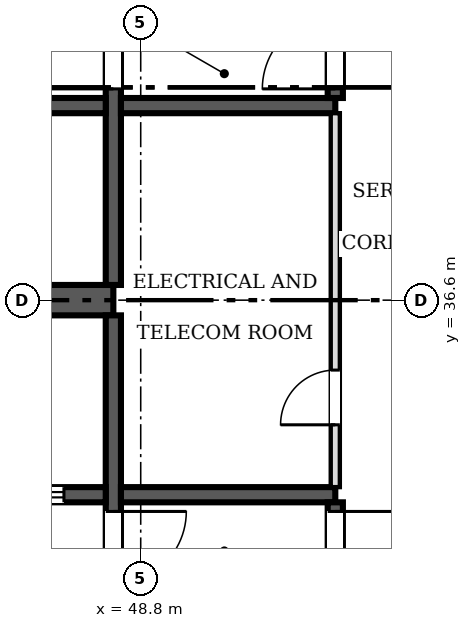
"""IFC4 building model, lengths in metres.
Left out: names, types, materials, properties, quantities, classifications, styles, units other than length and angle.
Written with IfcOpenShell. Run it as: python <this file> out.ifc"""

import sys

from ifc_helpers import new_model, si_unit, direction, frame, frame_2d, origin, place, context, subcontext, project, spatial, rectangle, extrude, source, transform, mapped, element, fill, save


model = new_model("IFC4")
c1 = context("Model", 3, precision=1e-05, world=origin(), true_north=direction((0.0, 1.0)))
c2 = subcontext(c1, "Body", "Model", "MODEL_VIEW")
j1 = project(units=[si_unit("LENGTHUNIT", "METRE"), si_unit("PLANEANGLEUNIT", "RADIAN")], contexts=[c1])
p1 = place(None, origin())
s1 = spatial("IfcSite", under=j1, at=p1, CompositionType="ELEMENT")
p2 = place(p1, origin())
s2 = spatial("IfcBuilding", under=s1, at=p2, CompositionType="ELEMENT")
p3 = place(p2, frame((0.0, 0.0, 52.4)))
s3 = spatial("IfcBuildingStorey", under=s2, at=p3, CompositionType="ELEMENT", Elevation=52.4)
p4 = place(p3, frame((31.4, 36.6, 0.0), z_axis=(0.0, 0.0, 1.0), x_axis=(1.0, 0.0, 0.0)))
e1 = element("IfcWall", 1, at=p4, inside=s3, PredefinedType="SHEAR", context=c2, shape_type="SweptSolid", body=[
    extrude(rectangle(XDim=16.95, YDim=0.5, at=frame_2d((8.475, 0.0))), origin(), (0.0, 0.0, 1.0), 3.8),
])
p5 = place(p3, frame((48.35, 36.35, 0.0), z_axis=(0.0, 0.0, 1.0), x_axis=(0.0, -1.0, 0.0)))
e2 = element("IfcWall", 2, at=p5, inside=s3, PredefinedType="SOLIDWALL", context=c2, shape_type="SweptSolid", body=[
    extrude(rectangle(XDim=11.05, YDim=0.25, at=frame_2d((5.525, 0.0))), origin(), (0.0, 0.0, 1.0), 3.8),
])
m1 = source(origin(), c2, "Body", "SweptSolid", [
    extrude(rectangle(XDim=1.2, YDim=2.1, at=frame_2d((0.6, 1.05))), frame((0.0, 0.135, 0.0), z_axis=(0.0, -1.0, 0.0), x_axis=(1.0, 0.0, 0.0)), (0.0, 0.0, 1.0), 0.27),
])
p6 = place(p5, frame((3.225, 0.0, 0.0)))
e3 = element("IfcOpeningElement", 3, at=p6, cuts=e2, PredefinedType="OPENING", context=c2, shape_type="MappedRepresentation", body=[
    mapped(m1, transform((0.0, 0.0, 0.0), scale=1.0)),
])
p7 = place(p3, frame((48.35, 47.9, 0.0), z_axis=(0.0, 0.0, 1.0), x_axis=(0.0, -1.0, 0.0)))
e4 = element("IfcWall", 4, at=p7, inside=s3, PredefinedType="SOLIDWALL", context=c2, shape_type="SweptSolid", body=[
    extrude(rectangle(XDim=11.05, YDim=0.25, at=frame_2d((5.525, 0.0))), origin(), (0.0, 0.0, 1.0), 3.8),
])
p8 = place(p7, frame((6.625, 0.0, 0.0)))
e5 = element("IfcOpeningElement", 5, at=p8, cuts=e4, PredefinedType="OPENING", context=c2, shape_type="MappedRepresentation", body=[
    mapped(m1, transform((0.0, 0.0, 0.0), scale=1.0)),
])
p9 = place(p3, frame((48.225, 33.4, 0.0), z_axis=(0.0, 0.0, 1.0), x_axis=(-1.0, 0.0, 0.0)))
e6 = element("IfcWall", 6, at=p9, inside=s3, PredefinedType="SOLIDWALL", context=c2, shape_type="SweptSolid", body=[
    extrude(rectangle(XDim=5.275, YDim=0.25, at=frame_2d((2.638, 0.0))), origin(), (0.0, 0.0, 1.0), 3.8),
])
p10 = place(p9, frame((3.512, 0.0, 0.0)))
e7 = element("IfcOpeningElement", 7, at=p10, cuts=e6, PredefinedType="OPENING", context=c2, shape_type="MappedRepresentation", body=[
    mapped(m1, transform((0.0, 0.0, 0.0), scale=1.0)),
])
p11 = place(p9, frame((0.688, 0.0, 0.0)))
e8 = element("IfcOpeningElement", 8, at=p11, cuts=e6, PredefinedType="OPENING", context=c2, shape_type="MappedRepresentation", body=[
    mapped(m1, transform((0.0, 0.0, 0.0), scale=1.0)),
])
p12 = place(p3, frame((48.475, 33.4, 0.0), z_axis=(0.0, 0.0, 1.0), x_axis=(1.0, 0.0, 0.0)))
e9 = element("IfcWall", 9, at=p12, inside=s3, PredefinedType="SOLIDWALL", context=c2, shape_type="SweptSolid", body=[
    extrude(rectangle(XDim=3.525, YDim=0.25, at=frame_2d((1.762, 0.0))), origin(), (0.0, 0.0, 1.0), 3.8),
])
p13 = place(p3, frame((42.95, 39.8, 0.0), z_axis=(0.0, 0.0, 1.0), x_axis=(1.0, 0.0, 0.0)))
e10 = element("IfcWall", 10, at=p13, inside=s3, PredefinedType="SOLIDWALL", context=c2, shape_type="SweptSolid", body=[
    extrude(rectangle(XDim=5.275, YDim=0.25, at=frame_2d((2.638, 0.0))), origin(), (0.0, 0.0, 1.0), 3.8),
])
p14 = place(p3, frame((48.475, 39.8, 0.0), z_axis=(0.0, 0.0, 1.0), x_axis=(1.0, 0.0, 0.0)))
e11 = element("IfcWall", 11, at=p14, inside=s3, PredefinedType="SOLIDWALL", context=c2, shape_type="SweptSolid", body=[
    extrude(rectangle(XDim=3.525, YDim=0.25, at=frame_2d((1.762, 0.0))), origin(), (0.0, 0.0, 1.0), 3.8),
])
p15 = place(p3, frame((52.0, 25.3, 0.0), z_axis=(0.0, 0.0, 1.0), x_axis=(0.0, 1.0, 0.0)))
e12 = element("IfcWall", 12, at=p15, inside=s3, PredefinedType="SOLIDWALL", context=c2, shape_type="SweptSolid", body=[
    extrude(rectangle(XDim=7.975, YDim=0.25, at=frame_2d((3.987, 0.0))), origin(), (0.0, 0.0, 1.0), 3.8),
])
p16 = place(p15, frame((6.625, 0.0, 0.0)))
e13 = element("IfcOpeningElement", 13, at=p16, cuts=e12, PredefinedType="OPENING", context=c2, shape_type="MappedRepresentation", body=[
    mapped(m1, transform((0.0, 0.0, 0.0), scale=1.0)),
])
p17 = place(p3, frame((52.0, 39.925, 0.0), z_axis=(0.0, 0.0, 1.0), x_axis=(0.0, 1.0, 0.0)))
e14 = element("IfcWall", 14, at=p17, inside=s3, PredefinedType="SOLIDWALL", context=c2, shape_type="SweptSolid", body=[
    extrude(rectangle(XDim=7.975, YDim=0.25, at=frame_2d((3.987, 0.0))), origin(), (0.0, 0.0, 1.0), 3.8),
])
p18 = place(p17, frame((0.15, 0.0, 0.0)))
e15 = element("IfcOpeningElement", 15, at=p18, cuts=e14, PredefinedType="OPENING", context=c2, shape_type="MappedRepresentation", body=[
    mapped(m1, transform((0.0, 0.0, 0.0), scale=1.0)),
])
p19 = place(p3, frame((52.0, 33.525, 0.0), z_axis=(0.0, 0.0, 1.0), x_axis=(0.0, 1.0, 0.0)))
e16 = element("IfcWall", 16, at=p19, inside=s3, PredefinedType="PARTITIONING", context=c2, shape_type="SweptSolid", body=[
    extrude(rectangle(XDim=6.15, YDim=0.15, at=frame_2d((3.075, 0.0))), origin(), (0.0, 0.0, 1.0), 3.6),
])
m2 = source(origin(), c2, "Body", "SweptSolid", [
    extrude(rectangle(XDim=0.9, YDim=2.1, at=frame_2d((0.45, 1.05))), frame((0.0, 0.085, 0.0), z_axis=(0.0, -1.0, 0.0), x_axis=(1.0, 0.0, 0.0)), (0.0, 0.0, 1.0), 0.17),
])
p20 = place(p19, frame((1.025, 0.0, 0.0)))
e17 = element("IfcOpeningElement", 17, at=p20, cuts=e16, PredefinedType="OPENING", context=c2, shape_type="MappedRepresentation", body=[
    mapped(m2, transform((0.0, 0.0, 0.0), scale=1.0)),
])
m3 = source(origin(), c2, "Body", "SweptSolid", [
    extrude(rectangle(XDim=1.2, YDim=2.1, at=frame_2d((0.6, 1.05))), frame((0.0, 0.025, 0.0), z_axis=(0.0, -1.0, 0.0), x_axis=(1.0, 0.0, 0.0)), (0.0, 0.0, 1.0), 0.05),
])
p21 = place(p6, origin())
e18 = element("IfcDoor", 18, at=p21, inside=s3, OperationType="SINGLE_SWING_LEFT", PredefinedType="DOOR", context=c2, shape_type="MappedRepresentation", body=[
    mapped(m3, transform((0.0, 0.0, 0.0), scale=1.0)),
])
fill(e3, e18)
p22 = place(p8, origin())
e19 = element("IfcDoor", 19, at=p22, inside=s3, OperationType="SINGLE_SWING_RIGHT", PredefinedType="DOOR", context=c2, shape_type="MappedRepresentation", body=[
    mapped(m3, transform((0.0, 0.0, 0.0), scale=1.0)),
])
fill(e5, e19)
p23 = place(p11, origin())
e20 = element("IfcDoor", 20, at=p23, inside=s3, OperationType="DOUBLE_DOOR_SLIDING", PredefinedType="DOOR", context=c2, shape_type="MappedRepresentation", body=[
    mapped(m3, transform((0.0, 0.0, 0.0), scale=1.0)),
])
fill(e8, e20)
p24 = place(p16, origin())
e21 = element("IfcDoor", 21, at=p24, inside=s3, OperationType="SINGLE_SWING_RIGHT", PredefinedType="DOOR", context=c2, shape_type="MappedRepresentation", body=[
    mapped(m3, transform((0.0, 0.0, 0.0), scale=1.0)),
])
fill(e13, e21)
p25 = place(p18, origin())
e22 = element("IfcDoor", 22, at=p25, inside=s3, OperationType="SINGLE_SWING_LEFT", PredefinedType="DOOR", context=c2, shape_type="MappedRepresentation", body=[
    mapped(m3, transform((0.0, 0.0, 0.0), scale=1.0)),
])
fill(e15, e22)
m4 = source(origin(), c2, "Body", "SweptSolid", [
    extrude(rectangle(XDim=0.9, YDim=2.1, at=frame_2d((0.45, 1.05))), frame((0.0, 0.025, 0.0), z_axis=(0.0, -1.0, 0.0), x_axis=(1.0, 0.0, 0.0)), (0.0, 0.0, 1.0), 0.05),
])
p26 = place(p20, origin())
e23 = element("IfcDoor", 23, at=p26, inside=s3, OperationType="SINGLE_SWING_LEFT", PredefinedType="DOOR", context=c2, shape_type="MappedRepresentation", body=[
    mapped(m4, transform((0.0, 0.0, 0.0), scale=1.0)),
])
fill(e17, e23)
save(model, sys.argv[1])
